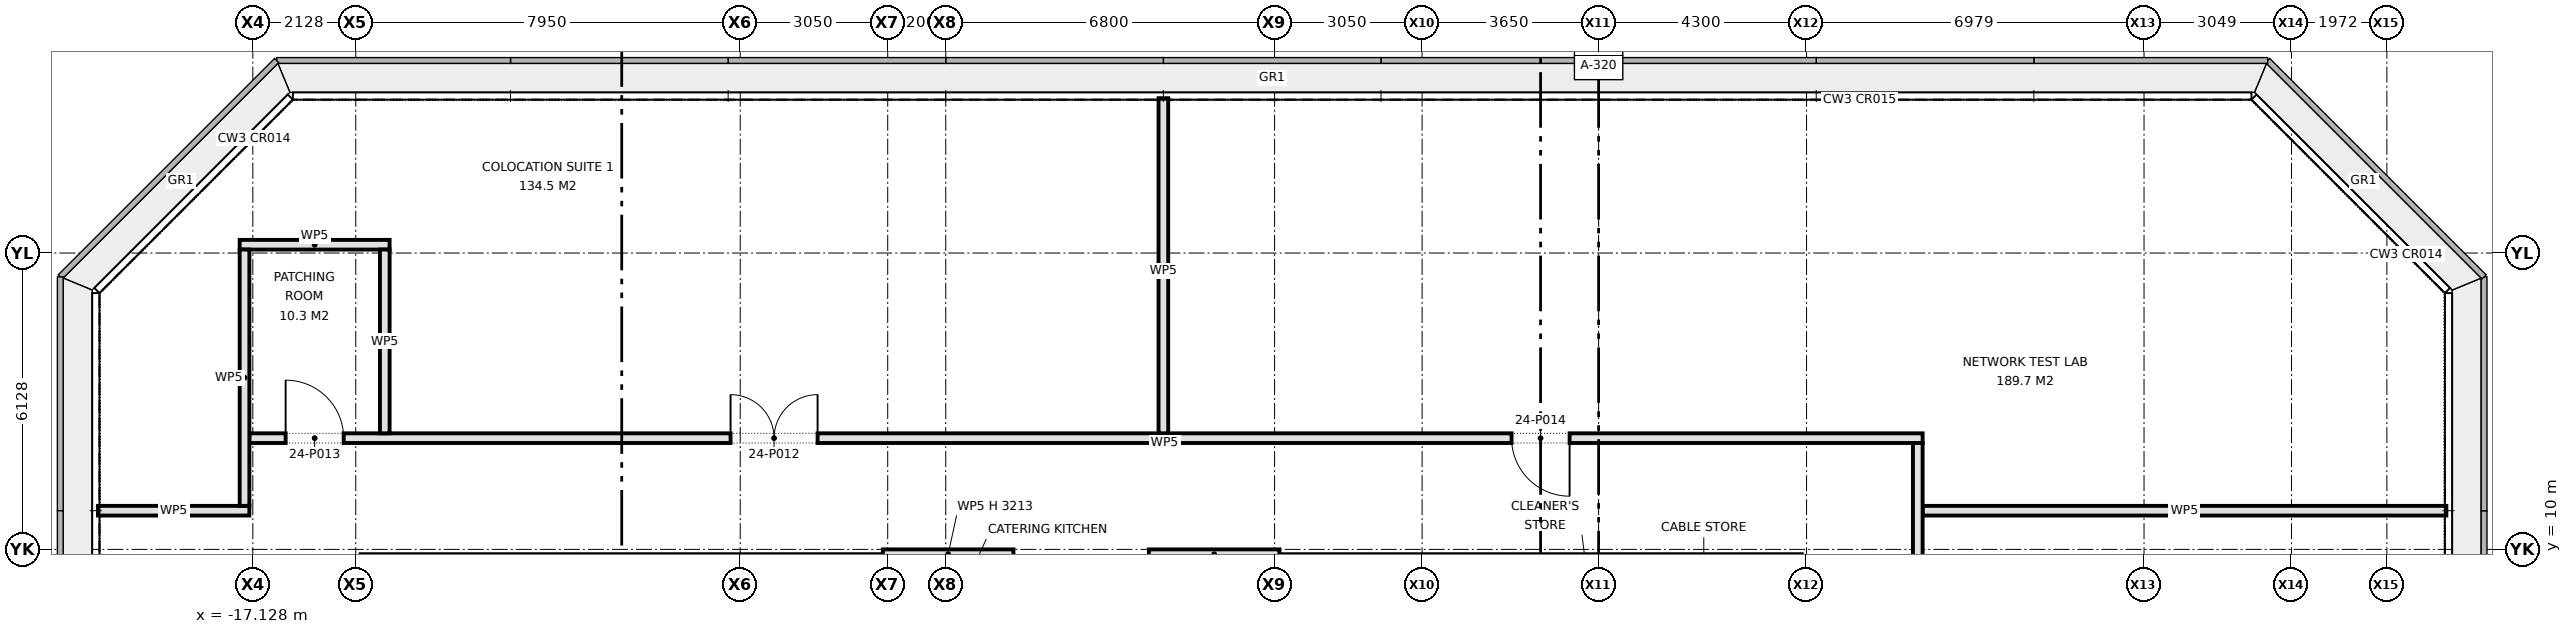
"""IFC4 building model, lengths in metres.
Left out: names, types, materials, properties, quantities, classifications, styles, units other than length and angle.
Written with IfcOpenShell. Run it as: python <this file> out.ifc"""

import sys

from ifc_helpers import new_model, si_unit, direction, frame, frame_2d, origin, place, context, subcontext, project, spatial, rectangle, extrude, element, fill, save


model = new_model("IFC4")
c1 = context("Model", 3, precision=1e-05, world=origin(), true_north=direction((0.0, 1.0)))
c2 = subcontext(c1, "Body", "Model", "MODEL_VIEW")
j1 = project(units=[si_unit("LENGTHUNIT", "METRE"), si_unit("PLANEANGLEUNIT", "RADIAN")], contexts=[c1])
p1 = place(None, origin())
s1 = spatial("IfcSite", under=j1, at=p1, CompositionType="ELEMENT")
p2 = place(p1, origin())
s2 = spatial("IfcBuilding", under=s1, at=p2, CompositionType="ELEMENT")
p3 = place(p2, frame((0.0, 0.0, 108.4)))
s3 = spatial("IfcBuildingStorey", under=s2, at=p3, CompositionType="ELEMENT", Elevation=108.4)
for number, where, z_axis, x_axis in (
    (1, (-4.1, 9.9, 0.0), (0.0, 0.0, 1.0), (1.0, 0.0, 0.0)),
    (2, (1.4, 9.9, 0.0), (0.0, 0.0, 1.0), (1.0, 0.0, 0.0)),
):
    element("IfcWall", number, at=place(p3, frame(where, z_axis=z_axis, x_axis=x_axis)), inside=s3, PredefinedType="PARTITIONING", context=c2, shape_type="SweptSolid", body=[
        extrude(rectangle(XDim=2.7, YDim=0.2, at=frame_2d((1.35, 0.0))), origin(), (0.0, 0.0, 1.0), 3.213),
    ])
p4 = place(p3, frame((-20.33, 10.8, 0.0), z_axis=(0.0, 0.0, 1.0), x_axis=(1.0, 0.0, 0.0)))
e3 = element("IfcWall", 3, at=p4, inside=s3, PredefinedType="PARTITIONING", context=c2, shape_type="SweptSolid", body=[
    extrude(rectangle(XDim=3.13, YDim=0.2, at=frame_2d((1.565, 0.0))), origin(), (0.0, 0.0, 1.0), 4.15),
])
p5 = place(p3, frame((17.4, 10.8, 0.0), z_axis=(0.0, 0.0, 1.0), x_axis=(1.0, 0.0, 0.0)))
e4 = element("IfcWall", 4, at=p5, inside=s3, PredefinedType="PARTITIONING", context=c2, shape_type="SweptSolid", body=[
    extrude(rectangle(XDim=10.83, YDim=0.2, at=frame_2d((5.415, 0.0))), origin(), (0.0, 0.0, 1.0), 4.15),
])
p6 = place(p3, frame((-17.2, 12.3, 0.0), z_axis=(0.0, 0.0, 1.0), x_axis=(1.0, 0.0, 0.0)))
e5 = element("IfcWall", 5, at=p6, inside=s3, PredefinedType="PARTITIONING", context=c2, shape_type="SweptSolid", body=[
    extrude(rectangle(XDim=34.6, YDim=0.2, at=frame_2d((17.3, 0.0))), origin(), (0.0, 0.0, 1.0), 4.15),
])
p7 = place(p6, frame((9.95, 0.0, 0.0)))
e6 = element("IfcOpeningElement", 6, at=p7, cuts=e5, PredefinedType="OPENING", context=c2, shape_type="SweptSolid", body=[
    extrude(rectangle(XDim=1.8, YDim=2.1, at=frame_2d((0.9, 1.05))), frame((0.0, 0.11, 0.0), z_axis=(0.0, -1.0, 0.0), x_axis=(1.0, 0.0, 0.0)), (0.0, 0.0, 1.0), 0.22),
])
p8 = place(p6, frame((0.75, 0.0, 0.0)))
e7 = element("IfcOpeningElement", 7, at=p8, cuts=e5, PredefinedType="OPENING", context=c2, shape_type="SweptSolid", body=[
    extrude(rectangle(XDim=1.2, YDim=2.1, at=frame_2d((0.6, 1.05))), frame((0.0, 0.11, 0.0), z_axis=(0.0, -1.0, 0.0), x_axis=(1.0, 0.0, 0.0)), (0.0, 0.0, 1.0), 0.22),
])
p9 = place(p6, frame((26.1, 0.0, 0.0)))
e8 = element("IfcOpeningElement", 8, at=p9, cuts=e5, PredefinedType="OPENING", context=c2, shape_type="SweptSolid", body=[
    extrude(rectangle(XDim=1.2, YDim=2.1, at=frame_2d((0.6, 1.05))), frame((0.0, 0.11, 0.0), z_axis=(0.0, -1.0, 0.0), x_axis=(1.0, 0.0, 0.0)), (0.0, 0.0, 1.0), 0.22),
])
p10 = place(p3, frame((-17.4, 16.3, 0.0), z_axis=(0.0, 0.0, 1.0), x_axis=(1.0, 0.0, 0.0)))
e9 = element("IfcWall", 9, at=p10, inside=s3, PredefinedType="PARTITIONING", context=c2, shape_type="SweptSolid", body=[
    extrude(rectangle(XDim=3.1, YDim=0.2, at=frame_2d((1.55, 0.0))), origin(), (0.0, 0.0, 1.0), 4.15),
])
p11 = place(p3, frame((17.3, -12.2, 0.0), z_axis=(0.0, 0.0, 1.0), x_axis=(0.0, 1.0, 0.0)))
e10 = element("IfcWall", 10, at=p11, inside=s3, PredefinedType="PARTITIONING", context=c2, shape_type="SweptSolid", body=[
    extrude(rectangle(XDim=24.4, YDim=0.2, at=frame_2d((12.2, 0.0))), origin(), (0.0, 0.0, 1.0), 4.15),
])
p12 = place(p11, frame((11.85, 0.0, 0.0)))
e11 = element("IfcOpeningElement", 11, at=p12, cuts=e10, PredefinedType="OPENING", context=c2, shape_type="SweptSolid", body=[
    extrude(rectangle(XDim=1.8, YDim=2.1, at=frame_2d((0.9, 1.05))), frame((0.0, 0.11, 0.0), z_axis=(0.0, -1.0, 0.0), x_axis=(1.0, 0.0, 0.0)), (0.0, 0.0, 1.0), 0.22),
])
p13 = place(p11, frame((0.7, 0.0, 0.0)))
e12 = element("IfcOpeningElement", 12, at=p13, cuts=e10, PredefinedType="OPENING", context=c2, shape_type="SweptSolid", body=[
    extrude(rectangle(XDim=1.0, YDim=2.1, at=frame_2d((0.5, 1.05))), frame((0.0, 0.11, 0.0), z_axis=(0.0, -1.0, 0.0), x_axis=(1.0, 0.0, 0.0)), (0.0, 0.0, 1.0), 0.22),
])
p14 = place(p3, frame((1.7, 12.4, 0.0), z_axis=(0.0, 0.0, 1.0), x_axis=(0.0, 1.0, 0.0)))
e13 = element("IfcWall", 13, at=p14, inside=s3, PredefinedType="PARTITIONING", context=c2, shape_type="SweptSolid", body=[
    extrude(rectangle(XDim=6.93, YDim=0.2, at=frame_2d((3.465, 0.0))), origin(), (0.0, 0.0, 1.0), 4.15),
])
p15 = place(p3, frame((-14.4, 12.4, 0.0), z_axis=(0.0, 0.0, 1.0), x_axis=(0.0, 1.0, 0.0)))
e14 = element("IfcWall", 14, at=p15, inside=s3, PredefinedType="PARTITIONING", context=c2, shape_type="SweptSolid", body=[
    extrude(rectangle(XDim=3.8, YDim=0.2, at=frame_2d((1.9, 0.0))), origin(), (0.0, 0.0, 1.0), 4.15),
])
p16 = place(p3, frame((-17.3, 10.9, 0.0), z_axis=(0.0, 0.0, 1.0), x_axis=(0.0, 1.0, 0.0)))
e15 = element("IfcWall", 15, at=p16, inside=s3, PredefinedType="PARTITIONING", context=c2, shape_type="SweptSolid", body=[
    extrude(rectangle(XDim=5.3, YDim=0.2, at=frame_2d((2.65, 0.0))), origin(), (0.0, 0.0, 1.0), 4.15),
])
p17 = place(p7, origin())
e16 = element("IfcDoor", 16, at=p17, inside=s3, OperationType="DOUBLE_DOOR_SINGLE_SWING", PredefinedType="DOOR", context=c2, shape_type="SweptSolid", body=[
    extrude(rectangle(XDim=1.8, YDim=2.1, at=frame_2d((0.9, 1.05))), frame((0.0, 0.025, 0.0), z_axis=(0.0, -1.0, 0.0), x_axis=(1.0, 0.0, 0.0)), (0.0, 0.0, 1.0), 0.05),
])
fill(e6, e16)
p18 = place(p8, origin())
e17 = element("IfcDoor", 17, at=p18, inside=s3, OperationType="SINGLE_SWING_LEFT", PredefinedType="DOOR", context=c2, shape_type="SweptSolid", body=[
    extrude(rectangle(XDim=1.2, YDim=2.1, at=frame_2d((0.6, 1.05))), frame((0.0, 0.025, 0.0), z_axis=(0.0, -1.0, 0.0), x_axis=(1.0, 0.0, 0.0)), (0.0, 0.0, 1.0), 0.05),
])
fill(e7, e17)
p19 = place(p9, frame((1.2, 0.0, 0.0), z_axis=(0.0, 0.0, 1.0), x_axis=(-1.0, 0.0, 0.0)))
e18 = element("IfcDoor", 18, at=p19, inside=s3, OperationType="SINGLE_SWING_LEFT", PredefinedType="DOOR", context=c2, shape_type="SweptSolid", body=[
    extrude(rectangle(XDim=1.2, YDim=2.1, at=frame_2d((0.6, 1.05))), frame((0.0, 0.025, 0.0), z_axis=(0.0, -1.0, 0.0), x_axis=(1.0, 0.0, 0.0)), (0.0, 0.0, 1.0), 0.05),
])
fill(e8, e18)
save(model, sys.argv[1])
